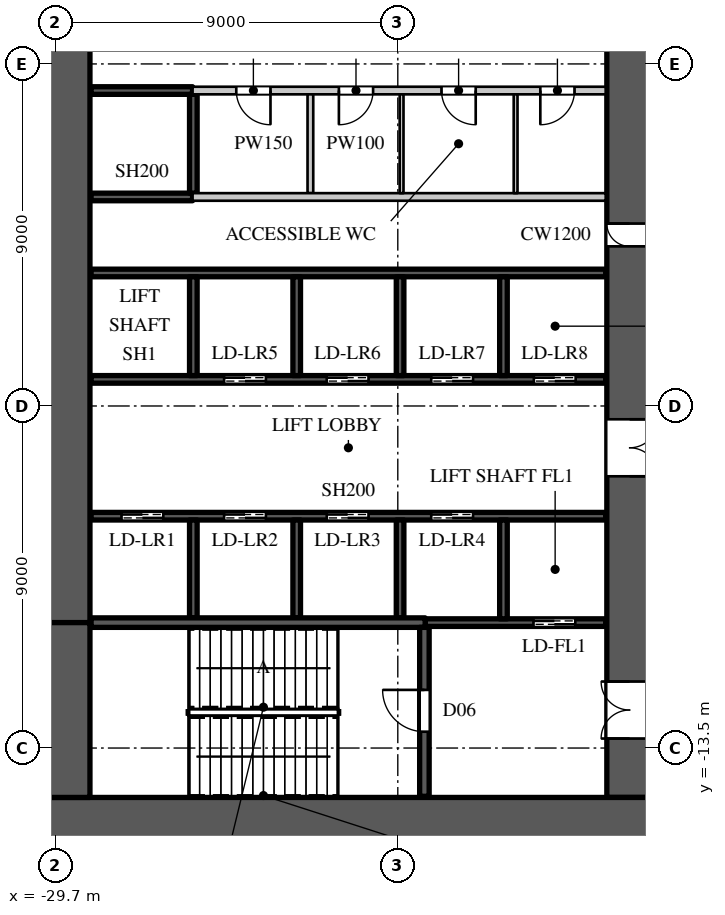
"""IFC4 building model, lengths in metres.
Left out: names, types, materials, properties, quantities, classifications, styles, units other than length and angle.
Written with IfcOpenShell. Run it as: python <this file> out.ifc"""

import sys

from ifc_helpers import new_model, si_unit, direction, frame, frame_2d, origin, place, context, subcontext, project, spatial, rectangle, extrude, element, fill, save


model = new_model("IFC4")
c1 = context("Model", 3, precision=1e-05, world=origin(), true_north=direction((0.0, 1.0)))
c2 = subcontext(c1, "Body", "Model", "MODEL_VIEW")
j1 = project(units=[si_unit("LENGTHUNIT", "METRE"), si_unit("PLANEANGLEUNIT", "RADIAN")], contexts=[c1])
p1 = place(None, origin())
s1 = spatial("IfcSite", under=j1, at=p1, CompositionType="ELEMENT")
p2 = place(p1, origin())
s2 = spatial("IfcBuilding", under=s1, at=p2, CompositionType="ELEMENT")
p3 = place(p2, frame((0.0, 0.0, 9.0)))
s3 = spatial("IfcBuildingStorey", under=s2, at=p3, CompositionType="ELEMENT", Elevation=9.0)
p4 = place(p3, frame((-30.0, -15.4, 0.0), z_axis=(0.0, 0.0, 1.0), x_axis=(1.0, 0.0, 0.0)))
e1 = element("IfcWall", 1, at=p4, inside=s3, PredefinedType="SHEAR", context=c2, shape_type="SweptSolid", body=[
    extrude(rectangle(XDim=16.0, YDim=1.2, at=frame_2d((8.0, 0.0))), origin(), (0.0, 0.0, 1.0), 10.0),
])
p5 = place(p3, frame((-14.6, -14.8, 0.0), z_axis=(0.0, 0.0, 1.0), x_axis=(0.0, 1.0, 0.0)))
e2 = element("IfcWall", 2, at=p5, inside=s3, PredefinedType="SHEAR", context=c2, shape_type="SweptSolid", body=[
    extrude(rectangle(XDim=29.6, YDim=1.2, at=frame_2d((14.8, 0.0))), origin(), (0.0, 0.0, 1.0), 10.0),
])
p6 = place(p5, frame((1.55, 0.0, 0.0)))
e3 = element("IfcOpeningElement", 3, at=p6, cuts=e2, PredefinedType="OPENING", context=c2, shape_type="SweptSolid", body=[
    extrude(rectangle(XDim=1.5, YDim=2.4, at=frame_2d((0.75, 1.2))), frame((0.0, 0.61, 0.0), z_axis=(0.0, -1.0, 0.0), x_axis=(1.0, 0.0, 0.0)), (0.0, 0.0, 1.0), 1.22),
])
p7 = place(p5, frame((26.55, 0.0, 0.0)))
e4 = element("IfcOpeningElement", 4, at=p7, cuts=e2, PredefinedType="OPENING", context=c2, shape_type="SweptSolid", body=[
    extrude(rectangle(XDim=1.5, YDim=2.4, at=frame_2d((0.75, 1.2))), frame((0.0, 0.61, 0.0), z_axis=(0.0, -1.0, 0.0), x_axis=(1.0, 0.0, 0.0)), (0.0, 0.0, 1.0), 1.22),
])
p8 = place(p5, frame((8.45, 0.0, 0.0)))
e5 = element("IfcOpeningElement", 5, at=p8, cuts=e2, PredefinedType="OPENING", context=c2, shape_type="SweptSolid", body=[
    extrude(rectangle(XDim=1.5, YDim=2.4, at=frame_2d((0.75, 1.2))), frame((0.0, 0.61, 0.0), z_axis=(0.0, -1.0, 0.0), x_axis=(1.0, 0.0, 0.0)), (0.0, 0.0, 1.0), 1.22),
])
p9 = place(p5, frame((19.65, 0.0, 0.0)))
e6 = element("IfcOpeningElement", 6, at=p9, cuts=e2, PredefinedType="OPENING", context=c2, shape_type="SweptSolid", body=[
    extrude(rectangle(XDim=1.5, YDim=2.4, at=frame_2d((0.75, 1.2))), frame((0.0, 0.61, 0.0), z_axis=(0.0, -1.0, 0.0), x_axis=(1.0, 0.0, 0.0)), (0.0, 0.0, 1.0), 1.22),
])
p10 = place(p5, frame((14.5, 0.0, 0.0)))
e7 = element("IfcOpeningElement", 7, at=p10, cuts=e2, PredefinedType="OPENING", context=c2, shape_type="SweptSolid", body=[
    extrude(rectangle(XDim=0.6, YDim=2.0, at=frame_2d((0.3, 1.0))), frame((0.0, 0.61, 0.0), z_axis=(0.0, -1.0, 0.0), x_axis=(1.0, 0.0, 0.0)), (0.0, 0.0, 1.0), 1.22),
])
p11 = place(p3, frame((-29.4, -10.2, 0.0), z_axis=(0.0, 0.0, 1.0), x_axis=(0.0, 1.0, 0.0)))
e8 = element("IfcWall", 8, at=p11, inside=s3, PredefinedType="SHEAR", context=c2, shape_type="SweptSolid", body=[
    extrude(rectangle(XDim=20.4, YDim=1.2, at=frame_2d((10.2, 0.0))), origin(), (0.0, 0.0, 1.0), 10.0),
])
p12 = place(p3, frame((-29.4, -14.8, 0.0), z_axis=(0.0, 0.0, 1.0), x_axis=(0.0, 1.0, 0.0)))
e9 = element("IfcWall", 9, at=p12, inside=s3, PredefinedType="SHEAR", context=c2, shape_type="SweptSolid", body=[
    extrude(rectangle(XDim=4.6, YDim=1.2, at=frame_2d((2.3, 0.0))), origin(), (0.0, 0.0, 1.0), 10.0),
])
p13 = place(p3, frame((-26.1, 3.8, 0.0), z_axis=(0.0, 0.0, 1.0), x_axis=(1.0, 0.0, 0.0)))
e10 = element("IfcWall", 10, at=p13, inside=s3, PredefinedType="PARTITIONING", context=c2, shape_type="SweptSolid", body=[
    extrude(rectangle(XDim=10.87, YDim=0.2, at=frame_2d((5.435, 0.0))), origin(), (0.0, 0.0, 1.0), 9.598),
])
p14 = place(p13, frame((1.15, 0.0, 0.0)))
e11 = element("IfcOpeningElement", 11, at=p14, cuts=e10, PredefinedType="OPENING", context=c2, shape_type="SweptSolid", body=[
    extrude(rectangle(XDim=0.9, YDim=2.2, at=frame_2d((0.45, 1.1))), frame((0.0, 0.11, 0.0), z_axis=(0.0, -1.0, 0.0), x_axis=(1.0, 0.0, 0.0)), (0.0, 0.0, 1.0), 0.22),
])
p15 = place(p13, frame((3.85, 0.0, 0.0)))
e12 = element("IfcOpeningElement", 12, at=p15, cuts=e10, PredefinedType="OPENING", context=c2, shape_type="SweptSolid", body=[
    extrude(rectangle(XDim=0.9, YDim=2.2, at=frame_2d((0.45, 1.1))), frame((0.0, 0.11, 0.0), z_axis=(0.0, -1.0, 0.0), x_axis=(1.0, 0.0, 0.0)), (0.0, 0.0, 1.0), 0.22),
])
p16 = place(p13, frame((6.55, 0.0, 0.0)))
e13 = element("IfcOpeningElement", 13, at=p16, cuts=e10, PredefinedType="OPENING", context=c2, shape_type="SweptSolid", body=[
    extrude(rectangle(XDim=0.9, YDim=2.2, at=frame_2d((0.45, 1.1))), frame((0.0, 0.11, 0.0), z_axis=(0.0, -1.0, 0.0), x_axis=(1.0, 0.0, 0.0)), (0.0, 0.0, 1.0), 0.22),
])
p17 = place(p13, frame((9.15, 0.0, 0.0)))
e14 = element("IfcOpeningElement", 14, at=p17, cuts=e10, PredefinedType="OPENING", context=c2, shape_type="SweptSolid", body=[
    extrude(rectangle(XDim=0.9, YDim=2.2, at=frame_2d((0.45, 1.1))), frame((0.0, 0.11, 0.0), z_axis=(0.0, -1.0, 0.0), x_axis=(1.0, 0.0, 0.0)), (0.0, 0.0, 1.0), 0.22),
])
p18 = place(p3, frame((-23.0, 1.1, 0.0), z_axis=(0.0, 0.0, 1.0), x_axis=(0.0, 1.0, 0.0)))
e15 = element("IfcWall", 15, at=p18, inside=s3, PredefinedType="PARTITIONING", context=c2, shape_type="SweptSolid", body=[
    extrude(rectangle(XDim=2.6, YDim=0.15, at=frame_2d((1.3, 0.0))), origin(), (0.0, 0.0, 1.0), 9.598),
])
p19 = place(p3, frame((-26.1, 1.0, 0.0), z_axis=(0.0, 0.0, 1.0), x_axis=(1.0, 0.0, 0.0)))
e16 = element("IfcWall", 16, at=p19, inside=s3, PredefinedType="PARTITIONING", context=c2, shape_type="SweptSolid", body=[
    extrude(rectangle(XDim=10.87, YDim=0.2, at=frame_2d((5.435, 0.0))), origin(), (0.0, 0.0, 1.0), 9.598),
])
p20 = place(p3, frame((-28.77, -7.4, 0.0), z_axis=(0.0, 0.0, 1.0), x_axis=(1.0, 0.0, 0.0)))
e17 = element("IfcWall", 17, at=p20, inside=s3, PredefinedType="SHEAR", context=c2, shape_type="SweptSolid", body=[
    extrude(rectangle(XDim=13.54, YDim=0.2, at=frame_2d((6.77, 0.0))), origin(), (0.0, 0.0, 1.0), 9.598),
])
p21 = place(p20, frame((0.8, 0.0, 0.0)))
e18 = element("IfcOpeningElement", 18, at=p21, cuts=e17, PredefinedType="OPENING", context=c2, shape_type="SweptSolid", body=[
    extrude(rectangle(XDim=1.1, YDim=2.2, at=frame_2d((0.55, 1.1))), frame((0.0, 0.11, 0.0), z_axis=(0.0, -1.0, 0.0), x_axis=(1.0, 0.0, 0.0)), (0.0, 0.0, 1.0), 0.22),
])
p22 = place(p20, frame((3.5, 0.0, 0.0)))
e19 = element("IfcOpeningElement", 19, at=p22, cuts=e17, PredefinedType="OPENING", context=c2, shape_type="SweptSolid", body=[
    extrude(rectangle(XDim=1.1, YDim=2.2, at=frame_2d((0.55, 1.1))), frame((0.0, 0.11, 0.0), z_axis=(0.0, -1.0, 0.0), x_axis=(1.0, 0.0, 0.0)), (0.0, 0.0, 1.0), 0.22),
])
p23 = place(p20, frame((6.2, 0.0, 0.0)))
e20 = element("IfcOpeningElement", 20, at=p23, cuts=e17, PredefinedType="OPENING", context=c2, shape_type="SweptSolid", body=[
    extrude(rectangle(XDim=1.1, YDim=2.2, at=frame_2d((0.55, 1.1))), frame((0.0, 0.11, 0.0), z_axis=(0.0, -1.0, 0.0), x_axis=(1.0, 0.0, 0.0)), (0.0, 0.0, 1.0), 0.22),
])
p24 = place(p20, frame((8.95, 0.0, 0.0)))
e21 = element("IfcOpeningElement", 21, at=p24, cuts=e17, PredefinedType="OPENING", context=c2, shape_type="SweptSolid", body=[
    extrude(rectangle(XDim=1.1, YDim=2.2, at=frame_2d((0.55, 1.1))), frame((0.0, 0.11, 0.0), z_axis=(0.0, -1.0, 0.0), x_axis=(1.0, 0.0, 0.0)), (0.0, 0.0, 1.0), 0.22),
])
p25 = place(p3, frame((-28.77, -3.8, 0.0), z_axis=(0.0, 0.0, 1.0), x_axis=(1.0, 0.0, 0.0)))
e22 = element("IfcWall", 22, at=p25, inside=s3, PredefinedType="SHEAR", context=c2, shape_type="SweptSolid", body=[
    extrude(rectangle(XDim=13.54, YDim=0.2, at=frame_2d((6.77, 0.0))), origin(), (0.0, 0.0, 1.0), 9.598),
])
p26 = place(p25, frame((3.5, 0.0, 0.0)))
e23 = element("IfcOpeningElement", 23, at=p26, cuts=e22, PredefinedType="OPENING", context=c2, shape_type="SweptSolid", body=[
    extrude(rectangle(XDim=1.1, YDim=2.2, at=frame_2d((0.55, 1.1))), frame((0.0, 0.11, 0.0), z_axis=(0.0, -1.0, 0.0), x_axis=(1.0, 0.0, 0.0)), (0.0, 0.0, 1.0), 0.22),
])
p27 = place(p25, frame((6.2, 0.0, 0.0)))
e24 = element("IfcOpeningElement", 24, at=p27, cuts=e22, PredefinedType="OPENING", context=c2, shape_type="SweptSolid", body=[
    extrude(rectangle(XDim=1.1, YDim=2.2, at=frame_2d((0.55, 1.1))), frame((0.0, 0.11, 0.0), z_axis=(0.0, -1.0, 0.0), x_axis=(1.0, 0.0, 0.0)), (0.0, 0.0, 1.0), 0.22),
])
p28 = place(p25, frame((8.95, 0.0, 0.0)))
e25 = element("IfcOpeningElement", 25, at=p28, cuts=e22, PredefinedType="OPENING", context=c2, shape_type="SweptSolid", body=[
    extrude(rectangle(XDim=1.1, YDim=2.2, at=frame_2d((0.55, 1.1))), frame((0.0, 0.11, 0.0), z_axis=(0.0, -1.0, 0.0), x_axis=(1.0, 0.0, 0.0)), (0.0, 0.0, 1.0), 0.22),
])
p29 = place(p25, frame((11.65, 0.0, 0.0)))
e26 = element("IfcOpeningElement", 26, at=p29, cuts=e22, PredefinedType="OPENING", context=c2, shape_type="SweptSolid", body=[
    extrude(rectangle(XDim=1.1, YDim=2.2, at=frame_2d((0.55, 1.1))), frame((0.0, 0.11, 0.0), z_axis=(0.0, -1.0, 0.0), x_axis=(1.0, 0.0, 0.0)), (0.0, 0.0, 1.0), 0.22),
])
p30 = place(p3, frame((-28.77, -1.0, 0.0), z_axis=(0.0, 0.0, 1.0), x_axis=(1.0, 0.0, 0.0)))
e27 = element("IfcWall", 27, at=p30, inside=s3, PredefinedType="SHEAR", context=c2, shape_type="SweptSolid", body=[
    extrude(rectangle(XDim=13.54, YDim=0.2, at=frame_2d((6.77, 0.0))), origin(), (0.0, 0.0, 1.0), 9.598),
])
for number, where, z_axis, x_axis in (
    (28, (-28.77, 1.0, 0.0), (0.0, 0.0, 1.0), (1.0, 0.0, 0.0)),
    (29, (-28.77, 3.8, 0.0), (0.0, 0.0, 1.0), (1.0, 0.0, 0.0)),
):
    element("IfcWall", number, at=place(p3, frame(where, z_axis=z_axis, x_axis=x_axis)), inside=s3, PredefinedType="SHEAR", context=c2, shape_type="SweptSolid", body=[
        extrude(rectangle(XDim=2.67, YDim=0.2, at=frame_2d((1.335, 0.0))), origin(), (0.0, 0.0, 1.0), 9.598),
    ])
p31 = place(p3, frame((-26.08, -10.075, 0.0), z_axis=(0.0, 0.0, 1.0), x_axis=(0.0, 1.0, 0.0)))
e30 = element("IfcWall", 30, at=p31, inside=s3, PredefinedType="SHEAR", context=c2, shape_type="SweptSolid", body=[
    extrude(rectangle(XDim=2.575, YDim=0.2, at=frame_2d((1.288, 0.0))), origin(), (0.0, 0.0, 1.0), 10.0),
])
p32 = place(p3, frame((-26.08, -3.7, 0.0), z_axis=(0.0, 0.0, 1.0), x_axis=(0.0, 1.0, 0.0)))
e31 = element("IfcWall", 31, at=p32, inside=s3, PredefinedType="SHEAR", context=c2, shape_type="SweptSolid", body=[
    extrude(rectangle(XDim=2.6, YDim=0.2, at=frame_2d((1.3, 0.0))), origin(), (0.0, 0.0, 1.0), 10.0),
])
p33 = place(p3, frame((-26.08, 1.1, 0.0), z_axis=(0.0, 0.0, 1.0), x_axis=(0.0, 1.0, 0.0)))
e32 = element("IfcWall", 32, at=p33, inside=s3, PredefinedType="SHEAR", context=c2, shape_type="SweptSolid", body=[
    extrude(rectangle(XDim=2.6, YDim=0.2, at=frame_2d((1.3, 0.0))), origin(), (0.0, 0.0, 1.0), 9.598),
])
p34 = place(p3, frame((-23.36, -10.075, 0.0), z_axis=(0.0, 0.0, 1.0), x_axis=(0.0, 1.0, 0.0)))
e33 = element("IfcWall", 33, at=p34, inside=s3, PredefinedType="SHEAR", context=c2, shape_type="SweptSolid", body=[
    extrude(rectangle(XDim=2.575, YDim=0.2, at=frame_2d((1.288, 0.0))), origin(), (0.0, 0.0, 1.0), 10.0),
])
p35 = place(p3, frame((-23.36, -3.7, 0.0), z_axis=(0.0, 0.0, 1.0), x_axis=(0.0, 1.0, 0.0)))
e34 = element("IfcWall", 34, at=p35, inside=s3, PredefinedType="SHEAR", context=c2, shape_type="SweptSolid", body=[
    extrude(rectangle(XDim=2.6, YDim=0.2, at=frame_2d((1.3, 0.0))), origin(), (0.0, 0.0, 1.0), 10.0),
])
p36 = place(p3, frame((-20.64, -10.075, 0.0), z_axis=(0.0, 0.0, 1.0), x_axis=(0.0, 1.0, 0.0)))
e35 = element("IfcWall", 35, at=p36, inside=s3, PredefinedType="SHEAR", context=c2, shape_type="SweptSolid", body=[
    extrude(rectangle(XDim=2.575, YDim=0.2, at=frame_2d((1.288, 0.0))), origin(), (0.0, 0.0, 1.0), 10.0),
])
p37 = place(p3, frame((-20.64, -3.7, 0.0), z_axis=(0.0, 0.0, 1.0), x_axis=(0.0, 1.0, 0.0)))
e36 = element("IfcWall", 36, at=p37, inside=s3, PredefinedType="SHEAR", context=c2, shape_type="SweptSolid", body=[
    extrude(rectangle(XDim=2.6, YDim=0.2, at=frame_2d((1.3, 0.0))), origin(), (0.0, 0.0, 1.0), 10.0),
])
p38 = place(p3, frame((-19.98, -10.2, 0.0), z_axis=(0.0, 0.0, 1.0), x_axis=(1.0, 0.0, 0.0)))
e37 = element("IfcWall", 37, at=p38, inside=s3, PredefinedType="SHEAR", context=c2, shape_type="SweptSolid", body=[
    extrude(rectangle(XDim=4.75, YDim=0.2, at=frame_2d((2.375, 0.0))), origin(), (0.0, 0.0, 1.0), 9.598),
])
p39 = place(p38, frame((2.85, 0.0, 0.0)))
e38 = element("IfcOpeningElement", 38, at=p39, cuts=e37, PredefinedType="OPENING", context=c2, shape_type="SweptSolid", body=[
    extrude(rectangle(XDim=1.1, YDim=2.2, at=frame_2d((0.55, 1.1))), frame((0.0, 0.11, 0.0), z_axis=(0.0, -1.0, 0.0), x_axis=(1.0, 0.0, 0.0)), (0.0, 0.0, 1.0), 0.22),
])
p40 = place(p3, frame((-17.92, -10.1, 0.0), z_axis=(0.0, 0.0, 1.0), x_axis=(0.0, 1.0, 0.0)))
e39 = element("IfcWall", 39, at=p40, inside=s3, PredefinedType="SHEAR", context=c2, shape_type="SweptSolid", body=[
    extrude(rectangle(XDim=2.6, YDim=0.2, at=frame_2d((1.3, 0.0))), origin(), (0.0, 0.0, 1.0), 10.0),
])
p41 = place(p3, frame((-17.92, -3.7, 0.0), z_axis=(0.0, 0.0, 1.0), x_axis=(0.0, 1.0, 0.0)))
e40 = element("IfcWall", 40, at=p41, inside=s3, PredefinedType="SHEAR", context=c2, shape_type="SweptSolid", body=[
    extrude(rectangle(XDim=2.6, YDim=0.2, at=frame_2d((1.3, 0.0))), origin(), (0.0, 0.0, 1.0), 10.0),
])
p42 = place(p3, frame((-28.77, -10.2, 0.0), z_axis=(0.0, 0.0, 1.0), x_axis=(1.0, 0.0, 0.0)))
e41 = element("IfcWall", 41, at=p42, inside=s3, PredefinedType="SHEAR", context=c2, shape_type="SweptSolid", body=[
    extrude(rectangle(XDim=8.79, YDim=0.25, at=frame_2d((4.395, 0.0))), origin(), (0.0, 0.0, 1.0), 9.598),
])
p43 = place(p3, frame((-20.0, -14.77, 0.0), z_axis=(0.0, 0.0, 1.0), x_axis=(0.0, 1.0, 0.0)))
e42 = element("IfcWall", 42, at=p43, inside=s3, PredefinedType="SHEAR", context=c2, shape_type="SweptSolid", body=[
    extrude(rectangle(XDim=4.445, YDim=0.25, at=frame_2d((2.223, 0.0))), origin(), (0.0, 0.0, 1.0), 9.598),
])
p44 = place(p43, frame((1.7, 0.0, 0.0)))
e43 = element("IfcOpeningElement", 43, at=p44, cuts=e42, PredefinedType="OPENING", context=c2, shape_type="SweptSolid", body=[
    extrude(rectangle(XDim=1.1, YDim=2.2, at=frame_2d((0.55, 1.1))), frame((0.0, 0.135, 0.0), z_axis=(0.0, -1.0, 0.0), x_axis=(1.0, 0.0, 0.0)), (0.0, 0.0, 1.0), 0.27),
])
for number, where, z_axis, x_axis in (
    (44, (-20.6, 1.1, 0.0), (0.0, 0.0, 1.0), (0.0, 1.0, 0.0)),
    (45, (-17.6, 1.1, 0.0), (0.0, 0.0, 1.0), (0.0, 1.0, 0.0)),
):
    element("IfcWall", number, at=place(p3, frame(where, z_axis=z_axis, x_axis=x_axis)), inside=s3, PredefinedType="PARTITIONING", context=c2, shape_type="SweptSolid", body=[
        extrude(rectangle(XDim=2.6, YDim=0.1, at=frame_2d((1.3, 0.0))), origin(), (0.0, 0.0, 1.0), 9.598),
    ])
p45 = place(p44, origin())
e46 = element("IfcDoor", 46, at=p45, inside=s3, OperationType="SINGLE_SWING_RIGHT", PredefinedType="DOOR", context=c2, shape_type="SweptSolid", body=[
    extrude(rectangle(XDim=1.1, YDim=2.2, at=frame_2d((0.55, 1.1))), frame((0.0, 0.025, 0.0), z_axis=(0.0, -1.0, 0.0), x_axis=(1.0, 0.0, 0.0)), (0.0, 0.0, 1.0), 0.05),
])
fill(e43, e46)
p46 = place(p14, origin())
e47 = element("IfcDoor", 47, at=p46, inside=s3, OperationType="SINGLE_SWING_LEFT", PredefinedType="DOOR", context=c2, shape_type="SweptSolid", body=[
    extrude(rectangle(XDim=0.9, YDim=2.2, at=frame_2d((0.45, 1.1))), frame((0.0, 0.025, 0.0), z_axis=(0.0, -1.0, 0.0), x_axis=(1.0, 0.0, 0.0)), (0.0, 0.0, 1.0), 0.05),
])
fill(e11, e47)
p47 = place(p15, origin())
e48 = element("IfcDoor", 48, at=p47, inside=s3, OperationType="SINGLE_SWING_RIGHT", PredefinedType="DOOR", context=c2, shape_type="SweptSolid", body=[
    extrude(rectangle(XDim=0.9, YDim=2.2, at=frame_2d((0.45, 1.1))), frame((0.0, 0.025, 0.0), z_axis=(0.0, -1.0, 0.0), x_axis=(1.0, 0.0, 0.0)), (0.0, 0.0, 1.0), 0.05),
])
fill(e12, e48)
p48 = place(p16, origin())
e49 = element("IfcDoor", 49, at=p48, inside=s3, OperationType="SINGLE_SWING_LEFT", PredefinedType="DOOR", context=c2, shape_type="SweptSolid", body=[
    extrude(rectangle(XDim=0.9, YDim=2.2, at=frame_2d((0.45, 1.1))), frame((0.0, 0.025, 0.0), z_axis=(0.0, -1.0, 0.0), x_axis=(1.0, 0.0, 0.0)), (0.0, 0.0, 1.0), 0.05),
])
fill(e13, e49)
p49 = place(p17, origin())
e50 = element("IfcDoor", 50, at=p49, inside=s3, OperationType="SINGLE_SWING_RIGHT", PredefinedType="DOOR", context=c2, shape_type="SweptSolid", body=[
    extrude(rectangle(XDim=0.9, YDim=2.2, at=frame_2d((0.45, 1.1))), frame((0.0, 0.025, 0.0), z_axis=(0.0, -1.0, 0.0), x_axis=(1.0, 0.0, 0.0)), (0.0, 0.0, 1.0), 0.05),
])
fill(e14, e50)
p50 = place(p21, origin())
e51 = element("IfcDoor", 51, at=p50, inside=s3, OperationType="DOUBLE_DOOR_SLIDING", PredefinedType="DOOR", context=c2, shape_type="SweptSolid", body=[
    extrude(rectangle(XDim=1.1, YDim=2.2, at=frame_2d((0.55, 1.1))), frame((0.0, 0.025, 0.0), z_axis=(0.0, -1.0, 0.0), x_axis=(1.0, 0.0, 0.0)), (0.0, 0.0, 1.0), 0.05),
])
fill(e18, e51)
p51 = place(p22, origin())
e52 = element("IfcDoor", 52, at=p51, inside=s3, OperationType="DOUBLE_DOOR_SLIDING", PredefinedType="DOOR", context=c2, shape_type="SweptSolid", body=[
    extrude(rectangle(XDim=1.1, YDim=2.2, at=frame_2d((0.55, 1.1))), frame((0.0, 0.025, 0.0), z_axis=(0.0, -1.0, 0.0), x_axis=(1.0, 0.0, 0.0)), (0.0, 0.0, 1.0), 0.05),
])
fill(e19, e52)
p52 = place(p23, origin())
e53 = element("IfcDoor", 53, at=p52, inside=s3, OperationType="DOUBLE_DOOR_SLIDING", PredefinedType="DOOR", context=c2, shape_type="SweptSolid", body=[
    extrude(rectangle(XDim=1.1, YDim=2.2, at=frame_2d((0.55, 1.1))), frame((0.0, 0.025, 0.0), z_axis=(0.0, -1.0, 0.0), x_axis=(1.0, 0.0, 0.0)), (0.0, 0.0, 1.0), 0.05),
])
fill(e20, e53)
p53 = place(p24, origin())
e54 = element("IfcDoor", 54, at=p53, inside=s3, OperationType="DOUBLE_DOOR_SLIDING", PredefinedType="DOOR", context=c2, shape_type="SweptSolid", body=[
    extrude(rectangle(XDim=1.1, YDim=2.2, at=frame_2d((0.55, 1.1))), frame((0.0, 0.025, 0.0), z_axis=(0.0, -1.0, 0.0), x_axis=(1.0, 0.0, 0.0)), (0.0, 0.0, 1.0), 0.05),
])
fill(e21, e54)
p54 = place(p39, origin())
e55 = element("IfcDoor", 55, at=p54, inside=s3, OperationType="DOUBLE_DOOR_SLIDING", PredefinedType="DOOR", context=c2, shape_type="SweptSolid", body=[
    extrude(rectangle(XDim=1.1, YDim=2.2, at=frame_2d((0.55, 1.1))), frame((0.0, 0.025, 0.0), z_axis=(0.0, -1.0, 0.0), x_axis=(1.0, 0.0, 0.0)), (0.0, 0.0, 1.0), 0.05),
])
fill(e38, e55)
p55 = place(p26, origin())
e56 = element("IfcDoor", 56, at=p55, inside=s3, OperationType="DOUBLE_DOOR_SLIDING", PredefinedType="DOOR", context=c2, shape_type="SweptSolid", body=[
    extrude(rectangle(XDim=1.1, YDim=2.2, at=frame_2d((0.55, 1.1))), frame((0.0, 0.025, 0.0), z_axis=(0.0, -1.0, 0.0), x_axis=(1.0, 0.0, 0.0)), (0.0, 0.0, 1.0), 0.05),
])
fill(e23, e56)
p56 = place(p27, origin())
e57 = element("IfcDoor", 57, at=p56, inside=s3, OperationType="DOUBLE_DOOR_SLIDING", PredefinedType="DOOR", context=c2, shape_type="SweptSolid", body=[
    extrude(rectangle(XDim=1.1, YDim=2.2, at=frame_2d((0.55, 1.1))), frame((0.0, 0.025, 0.0), z_axis=(0.0, -1.0, 0.0), x_axis=(1.0, 0.0, 0.0)), (0.0, 0.0, 1.0), 0.05),
])
fill(e24, e57)
p57 = place(p28, origin())
e58 = element("IfcDoor", 58, at=p57, inside=s3, OperationType="DOUBLE_DOOR_SLIDING", PredefinedType="DOOR", context=c2, shape_type="SweptSolid", body=[
    extrude(rectangle(XDim=1.1, YDim=2.2, at=frame_2d((0.55, 1.1))), frame((0.0, 0.025, 0.0), z_axis=(0.0, -1.0, 0.0), x_axis=(1.0, 0.0, 0.0)), (0.0, 0.0, 1.0), 0.05),
])
fill(e25, e58)
p58 = place(p29, origin())
e59 = element("IfcDoor", 59, at=p58, inside=s3, OperationType="DOUBLE_DOOR_SLIDING", PredefinedType="DOOR", context=c2, shape_type="SweptSolid", body=[
    extrude(rectangle(XDim=1.1, YDim=2.2, at=frame_2d((0.55, 1.1))), frame((0.0, 0.025, 0.0), z_axis=(0.0, -1.0, 0.0), x_axis=(1.0, 0.0, 0.0)), (0.0, 0.0, 1.0), 0.05),
])
fill(e26, e59)
p59 = place(p6, origin())
e60 = element("IfcDoor", 60, at=p59, inside=s3, OperationType="DOUBLE_DOOR_SINGLE_SWING", PredefinedType="DOOR", context=c2, shape_type="SweptSolid", body=[
    extrude(rectangle(XDim=1.5, YDim=2.4, at=frame_2d((0.75, 1.2))), frame((0.0, 0.025, 0.0), z_axis=(0.0, -1.0, 0.0), x_axis=(1.0, 0.0, 0.0)), (0.0, 0.0, 1.0), 0.05),
])
fill(e3, e60)
p60 = place(p8, origin())
e61 = element("IfcDoor", 61, at=p60, inside=s3, OperationType="DOUBLE_DOOR_SINGLE_SWING", PredefinedType="DOOR", context=c2, shape_type="SweptSolid", body=[
    extrude(rectangle(XDim=1.5, YDim=2.4, at=frame_2d((0.75, 1.2))), frame((0.0, 0.025, 0.0), z_axis=(0.0, -1.0, 0.0), x_axis=(1.0, 0.0, 0.0)), (0.0, 0.0, 1.0), 0.05),
])
fill(e5, e61)
p61 = place(p10, origin())
e62 = element("IfcDoor", 62, at=p61, inside=s3, OperationType="SINGLE_SWING_RIGHT", PredefinedType="DOOR", context=c2, shape_type="SweptSolid", body=[
    extrude(rectangle(XDim=0.6, YDim=2.0, at=frame_2d((0.3, 1.0))), frame((0.0, 0.025, 0.0), z_axis=(0.0, -1.0, 0.0), x_axis=(1.0, 0.0, 0.0)), (0.0, 0.0, 1.0), 0.05),
])
fill(e7, e62)
save(model, sys.argv[1])
